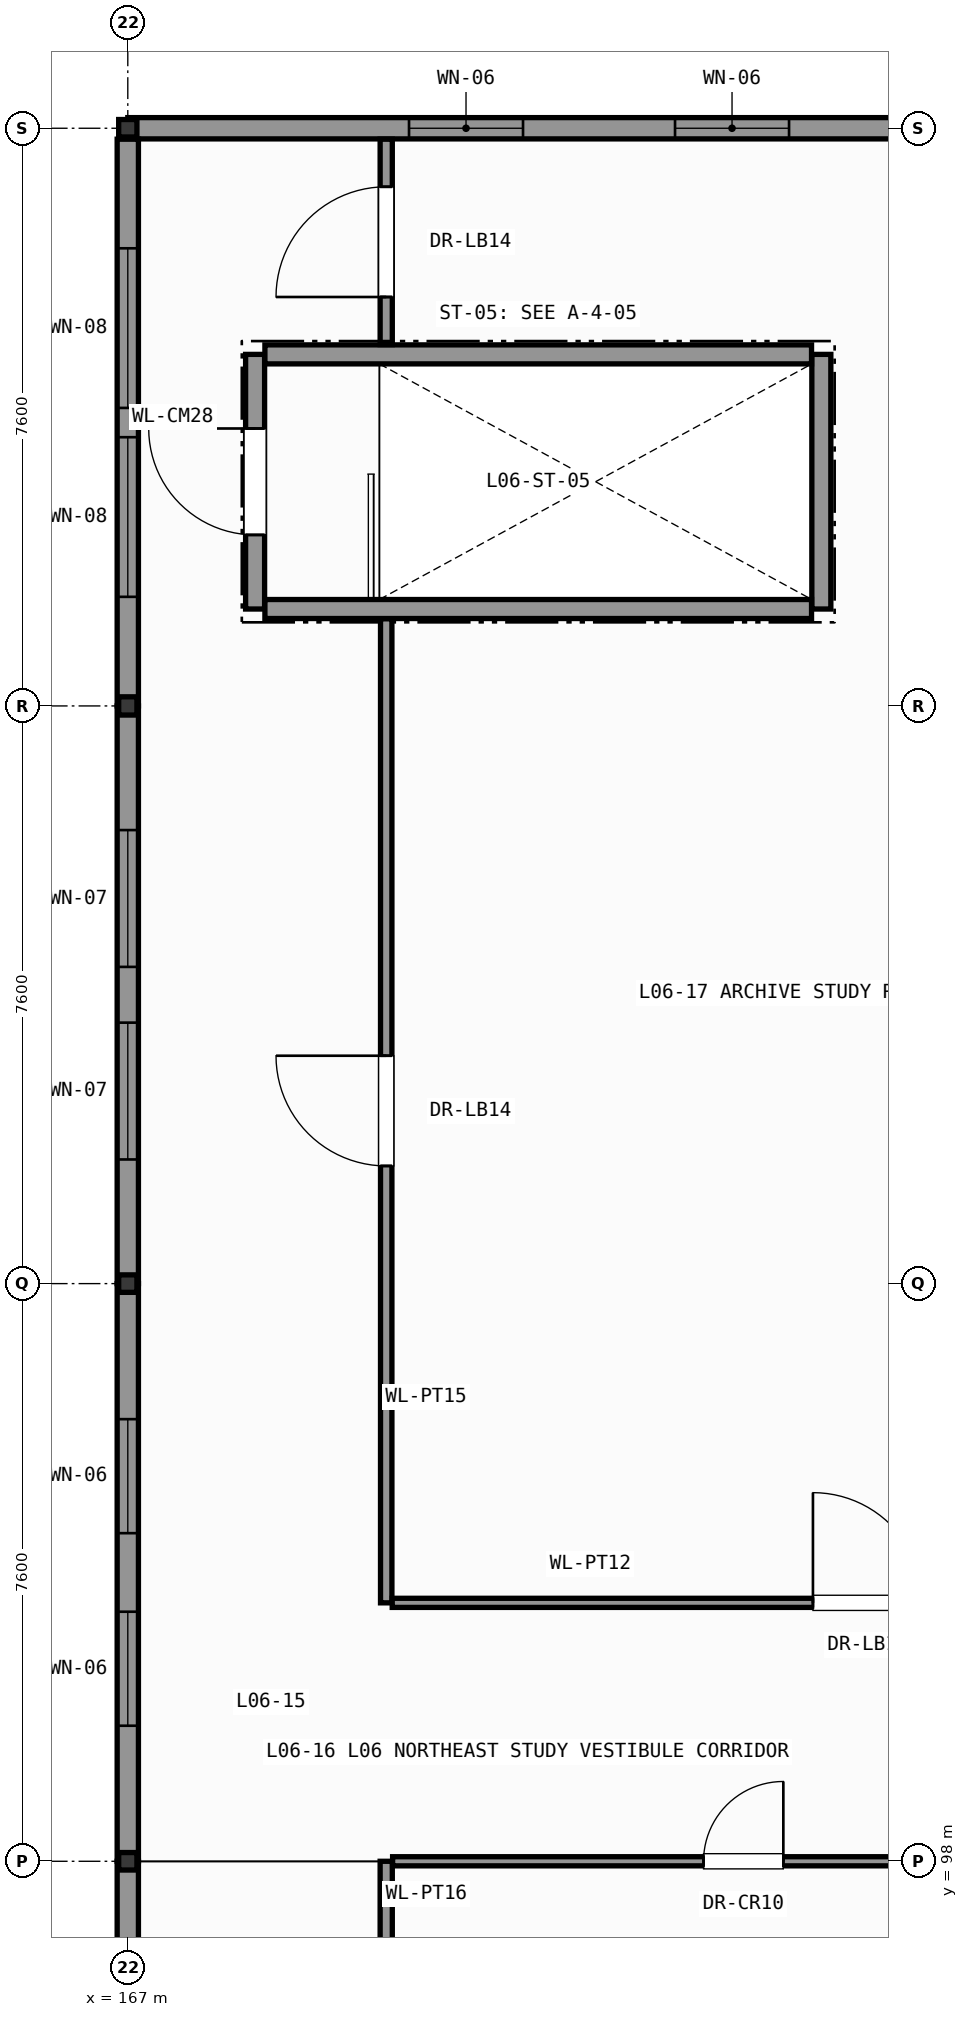
"""IFC4 building model, lengths in metres.
Left out: names, types, materials, properties, quantities, classifications, styles, units other than length and angle.
Written with IfcOpenShell. Run it as: python <this file> out.ifc"""

import sys

from ifc_helpers import new_model, si_unit, direction, frame, frame_2d, origin, origin_2d, place, context, subcontext, project, spatial, rectangle, i_section, extrude, element, fill, save


model = new_model("IFC4")
c1 = context("Model", 3, precision=1e-05, world=origin(), true_north=direction((0.0, 1.0)))
c2 = subcontext(c1, "Body", "Model", "MODEL_VIEW")
j1 = project(units=[si_unit("LENGTHUNIT", "METRE"), si_unit("PLANEANGLEUNIT", "RADIAN")], contexts=[c1])
p1 = place(None, origin())
s1 = spatial("IfcSite", under=j1, at=p1, CompositionType="ELEMENT")
p2 = place(p1, origin())
s2 = spatial("IfcBuilding", under=s1, at=p2, CompositionType="ELEMENT")
p3 = place(p2, frame((0.0, 0.0, 26.4)))
s3 = spatial("IfcBuildingStorey", under=s2, at=p3, CompositionType="ELEMENT", Elevation=26.4)
for number, where, z_axis, x_axis in (
    (1, (167.0, 98.0, 0.0), (0.0, 0.0, 1.0), (1.0, 0.0, 0.0)),
    (2, (167.0, 105.6, 0.0), (0.0, 0.0, 1.0), (1.0, 0.0, 0.0)),
):
    element("IfcColumn", number, at=place(p3, frame(where, z_axis=z_axis, x_axis=x_axis)), inside=s3, PredefinedType="COLUMN", context=c2, shape_type="SweptSolid", body=[
        extrude(i_section(OverallWidth=0.24, OverallDepth=0.23, WebThickness=0.008, FlangeThickness=0.012, FilletRadius=0.021, at=origin_2d()), origin(), (0.0, 0.0, 1.0), 4.2),
    ])
p4 = place(p3, frame((167.0, 113.2, 0.0), z_axis=(0.0, 0.0, 1.0), x_axis=(1.0, 0.0, 0.0)))
e3 = element("IfcColumn", 3, at=p4, inside=s3, PredefinedType="COLUMN", context=c2, shape_type="SweptSolid", body=[
    extrude(i_section(OverallWidth=0.24, OverallDepth=0.24, WebThickness=0.01, FlangeThickness=0.017, FilletRadius=0.021, at=origin_2d()), origin(), (0.0, 0.0, 1.0), 4.2),
])
p5 = place(p3, frame((167.0, 120.8, 0.0), z_axis=(0.0, 0.0, 1.0), x_axis=(1.0, 0.0, 0.0)))
e4 = element("IfcColumn", 4, at=p5, inside=s3, PredefinedType="COLUMN", context=c2, shape_type="SweptSolid", body=[
    extrude(i_section(OverallWidth=0.24, OverallDepth=0.23, WebThickness=0.008, FlangeThickness=0.012, FilletRadius=0.021, at=origin_2d()), origin(), (0.0, 0.0, 1.0), 4.2),
])
p6 = place(p3, frame((167.0, 120.8, 0.0), z_axis=(0.0, 0.0, 1.0), x_axis=(1.0, 0.0, 0.0)))
e5 = element("IfcWall", 5, at=p6, inside=s3, PredefinedType="SOLIDWALL", context=c2, shape_type="SweptSolid", body=[
    extrude(rectangle(XDim=12.0, YDim=0.28, at=frame_2d((6.0, 0.0))), origin(), (0.0, 0.0, 1.0), 3.435),
])
p7 = place(p6, frame((3.7, 0.0, 0.95)))
e6 = element("IfcOpeningElement", 6, at=p7, cuts=e5, PredefinedType="OPENING", context=c2, shape_type="SweptSolid", body=[
    extrude(rectangle(XDim=1.5, YDim=2.09, at=frame_2d((0.75, 1.045))), frame((0.0, 0.15, 0.0), z_axis=(0.0, -1.0, 0.0), x_axis=(1.0, 0.0, 0.0)), (0.0, 0.0, 1.0), 0.3),
])
p8 = place(p6, frame((7.2, 0.0, 0.95)))
e7 = element("IfcOpeningElement", 7, at=p8, cuts=e5, PredefinedType="OPENING", context=c2, shape_type="SweptSolid", body=[
    extrude(rectangle(XDim=1.5, YDim=2.09, at=frame_2d((0.75, 1.045))), frame((0.0, 0.15, 0.0), z_axis=(0.0, -1.0, 0.0), x_axis=(1.0, 0.0, 0.0)), (0.0, 0.0, 1.0), 0.3),
])
p9 = place(p3, frame((167.0, 113.2, 0.0), z_axis=(0.0, 0.0, 1.0), x_axis=(0.0, 1.0, 0.0)))
e8 = element("IfcWall", 8, at=p9, inside=s3, PredefinedType="SOLIDWALL", context=c2, shape_type="SweptSolid", body=[
    extrude(rectangle(XDim=7.456, YDim=0.28, at=frame_2d((3.728, 0.0))), origin(), (0.0, 0.0, 1.0), 3.695),
])
p10 = place(p9, frame((1.435, 0.0, 0.95)))
e9 = element("IfcOpeningElement", 9, at=p10, cuts=e8, PredefinedType="OPENING", context=c2, shape_type="SweptSolid", body=[
    extrude(rectangle(XDim=2.1, YDim=2.35, at=frame_2d((1.05, 1.175))), frame((0.0, 0.15, 0.0), z_axis=(0.0, -1.0, 0.0), x_axis=(1.0, 0.0, 0.0)), (0.0, 0.0, 1.0), 0.3),
])
p11 = place(p9, frame((3.921, 0.0, 0.95)))
e10 = element("IfcOpeningElement", 10, at=p11, cuts=e8, PredefinedType="OPENING", context=c2, shape_type="SweptSolid", body=[
    extrude(rectangle(XDim=2.1, YDim=2.35, at=frame_2d((1.05, 1.175))), frame((0.0, 0.15, 0.0), z_axis=(0.0, -1.0, 0.0), x_axis=(1.0, 0.0, 0.0)), (0.0, 0.0, 1.0), 0.3),
])
p12 = place(p3, frame((167.0, 105.6, 0.0), z_axis=(0.0, 0.0, 1.0), x_axis=(0.0, 1.0, 0.0)))
e11 = element("IfcWall", 11, at=p12, inside=s3, PredefinedType="SOLIDWALL", context=c2, shape_type="SweptSolid", body=[
    extrude(rectangle(XDim=7.6, YDim=0.28, at=frame_2d((3.8, 0.0))), origin(), (0.0, 0.0, 1.0), 3.695),
])
p13 = place(p12, frame((1.633, 0.0, 0.95)))
e12 = element("IfcOpeningElement", 12, at=p13, cuts=e11, PredefinedType="OPENING", context=c2, shape_type="SweptSolid", body=[
    extrude(rectangle(XDim=1.8, YDim=2.35, at=frame_2d((0.9, 1.175))), frame((0.0, 0.15, 0.0), z_axis=(0.0, -1.0, 0.0), x_axis=(1.0, 0.0, 0.0)), (0.0, 0.0, 1.0), 0.3),
])
p14 = place(p12, frame((4.167, 0.0, 0.95)))
e13 = element("IfcOpeningElement", 13, at=p14, cuts=e11, PredefinedType="OPENING", context=c2, shape_type="SweptSolid", body=[
    extrude(rectangle(XDim=1.8, YDim=2.35, at=frame_2d((0.9, 1.175))), frame((0.0, 0.15, 0.0), z_axis=(0.0, -1.0, 0.0), x_axis=(1.0, 0.0, 0.0)), (0.0, 0.0, 1.0), 0.3),
])
p15 = place(p3, frame((167.0, 98.0, 0.0), z_axis=(0.0, 0.0, 1.0), x_axis=(0.0, 1.0, 0.0)))
e14 = element("IfcWall", 14, at=p15, inside=s3, PredefinedType="SOLIDWALL", context=c2, shape_type="SweptSolid", body=[
    extrude(rectangle(XDim=7.6, YDim=0.28, at=frame_2d((3.8, 0.0))), origin(), (0.0, 0.0, 1.0), 3.695),
])
p16 = place(p15, frame((1.783, 0.0, 0.95)))
e15 = element("IfcOpeningElement", 15, at=p16, cuts=e14, PredefinedType="OPENING", context=c2, shape_type="SweptSolid", body=[
    extrude(rectangle(XDim=1.5, YDim=2.35, at=frame_2d((0.75, 1.175))), frame((0.0, 0.15, 0.0), z_axis=(0.0, -1.0, 0.0), x_axis=(1.0, 0.0, 0.0)), (0.0, 0.0, 1.0), 0.3),
])
p17 = place(p15, frame((4.317, 0.0, 0.95)))
e16 = element("IfcOpeningElement", 16, at=p17, cuts=e14, PredefinedType="OPENING", context=c2, shape_type="SweptSolid", body=[
    extrude(rectangle(XDim=1.5, YDim=2.35, at=frame_2d((0.75, 1.175))), frame((0.0, 0.15, 0.0), z_axis=(0.0, -1.0, 0.0), x_axis=(1.0, 0.0, 0.0)), (0.0, 0.0, 1.0), 0.3),
])
p18 = place(p3, frame((167.0, 90.4, 0.0), z_axis=(0.0, 0.0, 1.0), x_axis=(0.0, 1.0, 0.0)))
e17 = element("IfcWall", 17, at=p18, inside=s3, PredefinedType="SOLIDWALL", context=c2, shape_type="SweptSolid", body=[
    extrude(rectangle(XDim=7.6, YDim=0.28, at=frame_2d((3.8, 0.0))), origin(), (0.0, 0.0, 1.0), 3.695),
])
p19 = place(p18, frame((1.483, 0.0, 0.95)))
e18 = element("IfcOpeningElement", 18, at=p19, cuts=e17, PredefinedType="OPENING", context=c2, shape_type="SweptSolid", body=[
    extrude(rectangle(XDim=2.1, YDim=2.35, at=frame_2d((1.05, 1.175))), frame((0.0, 0.15, 0.0), z_axis=(0.0, -1.0, 0.0), x_axis=(1.0, 0.0, 0.0)), (0.0, 0.0, 1.0), 0.3),
])
p20 = place(p18, frame((4.017, 0.0, 0.95)))
e19 = element("IfcOpeningElement", 19, at=p20, cuts=e17, PredefinedType="OPENING", context=c2, shape_type="SweptSolid", body=[
    extrude(rectangle(XDim=2.1, YDim=2.35, at=frame_2d((1.05, 1.175))), frame((0.0, 0.15, 0.0), z_axis=(0.0, -1.0, 0.0), x_axis=(1.0, 0.0, 0.0)), (0.0, 0.0, 1.0), 0.3),
])
p21 = place(p3, frame((168.675, 114.475, 0.0), z_axis=(0.0, 0.0, 1.0), x_axis=(0.0, 1.0, 0.0)))
e20 = element("IfcWall", 20, at=p21, inside=s3, PredefinedType="SHEAR", context=c2, shape_type="SweptSolid", body=[
    extrude(rectangle(XDim=3.35, YDim=0.25, at=frame_2d((1.675, 0.0))), origin(), (0.0, 0.0, 1.0), 4.0),
])
p22 = place(p21, frame((0.975, 0.0, 0.0)))
e21 = element("IfcOpeningElement", 21, at=p22, cuts=e20, PredefinedType="OPENING", context=c2, shape_type="SweptSolid", body=[
    extrude(rectangle(XDim=1.4, YDim=2.2, at=frame_2d((0.7, 1.1))), frame((0.0, 0.135, 0.0), z_axis=(0.0, -1.0, 0.0), x_axis=(1.0, 0.0, 0.0)), (0.0, 0.0, 1.0), 0.27),
])
p23 = place(p3, frame((176.125, 114.475, 0.0), z_axis=(0.0, 0.0, 1.0), x_axis=(0.0, 1.0, 0.0)))
e22 = element("IfcWall", 22, at=p23, inside=s3, PredefinedType="SHEAR", context=c2, shape_type="SweptSolid", body=[
    extrude(rectangle(XDim=3.35, YDim=0.25, at=frame_2d((1.675, 0.0))), origin(), (0.0, 0.0, 1.0), 4.0),
])
for number, where, z_axis, x_axis in (
    (23, (168.804, 114.475, 0.0), (0.0, 0.0, 1.0), (1.0, 0.0, 0.0)),
    (24, (168.804, 117.825, 0.0), (0.0, 0.0, 1.0), (1.0, 0.0, 0.0)),
):
    element("IfcWall", number, at=place(p3, frame(where, z_axis=z_axis, x_axis=x_axis)), inside=s3, PredefinedType="SHEAR", context=c2, shape_type="SweptSolid", body=[
        extrude(rectangle(XDim=7.192, YDim=0.25, at=frame_2d((3.596, 0.0))), origin(), (0.0, 0.0, 1.0), 4.0),
    ])
p24 = place(p3, frame((170.4, 94.6, 0.0), z_axis=(0.0, 0.0, 1.0), x_axis=(0.0, 1.0, 0.0)))
e25 = element("IfcWall", 25, at=p24, inside=s3, PredefinedType="PARTITIONING", context=c2, shape_type="SweptSolid", body=[
    extrude(rectangle(XDim=3.4, YDim=0.16, at=frame_2d((1.7, 0.0))), origin(), (0.0, 0.0, 1.0), 4.0),
])
p25 = place(p24, frame((1.175, 0.0, 0.0)))
e26 = element("IfcOpeningElement", 26, at=p25, cuts=e25, PredefinedType="OPENING", context=c2, shape_type="SweptSolid", body=[
    extrude(rectangle(XDim=1.05, YDim=2.2, at=frame_2d((0.525, 1.1))), frame((0.0, 0.09, 0.0), z_axis=(0.0, -1.0, 0.0), x_axis=(1.0, 0.0, 0.0)), (0.0, 0.0, 1.0), 0.18),
])
p26 = place(p3, frame((170.484, 98.0, 0.0), z_axis=(0.0, 0.0, 1.0), x_axis=(1.0, 0.0, 0.0)))
e27 = element("IfcWall", 27, at=p26, inside=s3, PredefinedType="PARTITIONING", context=c2, shape_type="SweptSolid", body=[
    extrude(rectangle(XDim=9.232, YDim=0.12, at=frame_2d((4.616, 0.0))), origin(), (0.0, 0.0, 1.0), 3.435),
])
p27 = place(p26, frame((4.091, 0.0, 0.0)))
e28 = element("IfcOpeningElement", 28, at=p27, cuts=e27, PredefinedType="OPENING", context=c2, shape_type="SweptSolid", body=[
    extrude(rectangle(XDim=1.05, YDim=2.2, at=frame_2d((0.525, 1.1))), frame((0.0, 0.07, 0.0), z_axis=(0.0, -1.0, 0.0), x_axis=(1.0, 0.0, 0.0)), (0.0, 0.0, 1.0), 0.14),
])
p28 = place(p3, frame((170.4, 117.954, 0.0), z_axis=(0.0, 0.0, 1.0), x_axis=(0.0, 1.0, 0.0)))
e29 = element("IfcWall", 29, at=p28, inside=s3, PredefinedType="PARTITIONING", context=c2, shape_type="SweptSolid", body=[
    extrude(rectangle(XDim=2.702, YDim=0.16, at=frame_2d((1.351, 0.0))), origin(), (0.0, 0.0, 1.0), 4.0),
])
p29 = place(p28, frame((0.626, 0.0, 0.0)))
e30 = element("IfcOpeningElement", 30, at=p29, cuts=e29, PredefinedType="OPENING", context=c2, shape_type="SweptSolid", body=[
    extrude(rectangle(XDim=1.45, YDim=2.35, at=frame_2d((0.725, 1.175))), frame((0.0, 0.09, 0.0), z_axis=(0.0, -1.0, 0.0), x_axis=(1.0, 0.0, 0.0)), (0.0, 0.0, 1.0), 0.18),
])
p30 = place(p3, frame((170.4, 101.4, 0.0), z_axis=(0.0, 0.0, 1.0), x_axis=(0.0, 1.0, 0.0)))
e31 = element("IfcWall", 31, at=p30, inside=s3, PredefinedType="PARTITIONING", context=c2, shape_type="SweptSolid", body=[
    extrude(rectangle(XDim=12.946, YDim=0.15, at=frame_2d((6.473, 0.0))), origin(), (0.0, 0.0, 1.0), 4.0),
])
p31 = place(p30, frame((5.748, 0.0, 0.0)))
e32 = element("IfcOpeningElement", 32, at=p31, cuts=e31, PredefinedType="OPENING", context=c2, shape_type="SweptSolid", body=[
    extrude(rectangle(XDim=1.45, YDim=2.35, at=frame_2d((0.725, 1.175))), frame((0.0, 0.085, 0.0), z_axis=(0.0, -1.0, 0.0), x_axis=(1.0, 0.0, 0.0)), (0.0, 0.0, 1.0), 0.17),
])
p32 = place(p3, frame((170.479, 101.4, 0.0), z_axis=(0.0, 0.0, 1.0), x_axis=(1.0, 0.0, 0.0)))
e33 = element("IfcWall", 33, at=p32, inside=s3, PredefinedType="PARTITIONING", context=c2, shape_type="SweptSolid", body=[
    extrude(rectangle(XDim=12.521, YDim=0.12, at=frame_2d((6.26, 0.0))), origin(), (0.0, 0.0, 1.0), 4.0),
])
p33 = place(p32, frame((5.535, 0.0, 0.0)))
e34 = element("IfcOpeningElement", 34, at=p33, cuts=e33, PredefinedType="OPENING", context=c2, shape_type="SweptSolid", body=[
    extrude(rectangle(XDim=1.45, YDim=2.35, at=frame_2d((0.725, 1.175))), frame((0.0, 0.07, 0.0), z_axis=(0.0, -1.0, 0.0), x_axis=(1.0, 0.0, 0.0)), (0.0, 0.0, 1.0), 0.14),
])
p34 = place(p7, origin())
e35 = element("IfcWindow", 35, at=p34, inside=s3, PartitioningType="SINGLE_PANEL", PredefinedType="WINDOW", context=c2, shape_type="SweptSolid", body=[
    extrude(rectangle(XDim=1.5, YDim=2.09, at=frame_2d((0.75, 1.045))), frame((0.0, 0.03, 0.0), z_axis=(0.0, -1.0, 0.0), x_axis=(1.0, 0.0, 0.0)), (0.0, 0.0, 1.0), 0.06),
])
fill(e6, e35)
p35 = place(p8, origin())
e36 = element("IfcWindow", 36, at=p35, inside=s3, PartitioningType="SINGLE_PANEL", PredefinedType="WINDOW", context=c2, shape_type="SweptSolid", body=[
    extrude(rectangle(XDim=1.5, YDim=2.09, at=frame_2d((0.75, 1.045))), frame((0.0, 0.03, 0.0), z_axis=(0.0, -1.0, 0.0), x_axis=(1.0, 0.0, 0.0)), (0.0, 0.0, 1.0), 0.06),
])
fill(e7, e36)
p36 = place(p10, origin())
e37 = element("IfcWindow", 37, at=p36, inside=s3, PartitioningType="SINGLE_PANEL", PredefinedType="WINDOW", context=c2, shape_type="SweptSolid", body=[
    extrude(rectangle(XDim=2.1, YDim=2.35, at=frame_2d((1.05, 1.175))), frame((0.0, 0.03, 0.0), z_axis=(0.0, -1.0, 0.0), x_axis=(1.0, 0.0, 0.0)), (0.0, 0.0, 1.0), 0.06),
])
fill(e9, e37)
p37 = place(p11, origin())
e38 = element("IfcWindow", 38, at=p37, inside=s3, PartitioningType="SINGLE_PANEL", PredefinedType="WINDOW", context=c2, shape_type="SweptSolid", body=[
    extrude(rectangle(XDim=2.1, YDim=2.35, at=frame_2d((1.05, 1.175))), frame((0.0, 0.03, 0.0), z_axis=(0.0, -1.0, 0.0), x_axis=(1.0, 0.0, 0.0)), (0.0, 0.0, 1.0), 0.06),
])
fill(e10, e38)
p38 = place(p13, origin())
e39 = element("IfcWindow", 39, at=p38, inside=s3, PartitioningType="SINGLE_PANEL", PredefinedType="WINDOW", context=c2, shape_type="SweptSolid", body=[
    extrude(rectangle(XDim=1.8, YDim=2.35, at=frame_2d((0.9, 1.175))), frame((0.0, 0.03, 0.0), z_axis=(0.0, -1.0, 0.0), x_axis=(1.0, 0.0, 0.0)), (0.0, 0.0, 1.0), 0.06),
])
fill(e12, e39)
p39 = place(p14, origin())
e40 = element("IfcWindow", 40, at=p39, inside=s3, PartitioningType="SINGLE_PANEL", PredefinedType="WINDOW", context=c2, shape_type="SweptSolid", body=[
    extrude(rectangle(XDim=1.8, YDim=2.35, at=frame_2d((0.9, 1.175))), frame((0.0, 0.03, 0.0), z_axis=(0.0, -1.0, 0.0), x_axis=(1.0, 0.0, 0.0)), (0.0, 0.0, 1.0), 0.06),
])
fill(e13, e40)
p40 = place(p16, origin())
e41 = element("IfcWindow", 41, at=p40, inside=s3, PartitioningType="SINGLE_PANEL", PredefinedType="WINDOW", context=c2, shape_type="SweptSolid", body=[
    extrude(rectangle(XDim=1.5, YDim=2.35, at=frame_2d((0.75, 1.175))), frame((0.0, 0.03, 0.0), z_axis=(0.0, -1.0, 0.0), x_axis=(1.0, 0.0, 0.0)), (0.0, 0.0, 1.0), 0.06),
])
fill(e15, e41)
p41 = place(p17, origin())
e42 = element("IfcWindow", 42, at=p41, inside=s3, PartitioningType="SINGLE_PANEL", PredefinedType="WINDOW", context=c2, shape_type="SweptSolid", body=[
    extrude(rectangle(XDim=1.5, YDim=2.35, at=frame_2d((0.75, 1.175))), frame((0.0, 0.03, 0.0), z_axis=(0.0, -1.0, 0.0), x_axis=(1.0, 0.0, 0.0)), (0.0, 0.0, 1.0), 0.06),
])
fill(e16, e42)
p42 = place(p22, origin())
e43 = element("IfcDoor", 43, at=p42, inside=s3, OperationType="SINGLE_SWING_RIGHT", PredefinedType="DOOR", context=c2, shape_type="SweptSolid", body=[
    extrude(rectangle(XDim=1.4, YDim=2.2, at=frame_2d((0.7, 1.1))), frame((0.0, 0.025, 0.0), z_axis=(0.0, -1.0, 0.0), x_axis=(1.0, 0.0, 0.0)), (0.0, 0.0, 1.0), 0.05),
])
fill(e21, e43)
p43 = place(p27, origin())
e44 = element("IfcDoor", 44, at=p43, inside=s3, OperationType="SINGLE_SWING_RIGHT", PredefinedType="DOOR", context=c2, shape_type="SweptSolid", body=[
    extrude(rectangle(XDim=1.05, YDim=2.2, at=frame_2d((0.525, 1.1))), frame((0.0, 0.025, 0.0), z_axis=(0.0, -1.0, 0.0), x_axis=(1.0, 0.0, 0.0)), (0.0, 0.0, 1.0), 0.05),
])
fill(e28, e44)
p44 = place(p29, origin())
e45 = element("IfcDoor", 45, at=p44, inside=s3, OperationType="SINGLE_SWING_LEFT", PredefinedType="DOOR", context=c2, shape_type="SweptSolid", body=[
    extrude(rectangle(XDim=1.45, YDim=2.35, at=frame_2d((0.725, 1.175))), frame((0.0, 0.025, 0.0), z_axis=(0.0, -1.0, 0.0), x_axis=(1.0, 0.0, 0.0)), (0.0, 0.0, 1.0), 0.05),
])
fill(e30, e45)
p45 = place(p31, origin())
e46 = element("IfcDoor", 46, at=p45, inside=s3, OperationType="SINGLE_SWING_RIGHT", PredefinedType="DOOR", context=c2, shape_type="SweptSolid", body=[
    extrude(rectangle(XDim=1.45, YDim=2.35, at=frame_2d((0.725, 1.175))), frame((0.0, 0.025, 0.0), z_axis=(0.0, -1.0, 0.0), x_axis=(1.0, 0.0, 0.0)), (0.0, 0.0, 1.0), 0.05),
])
fill(e32, e46)
p46 = place(p33, origin())
e47 = element("IfcDoor", 47, at=p46, inside=s3, OperationType="SINGLE_SWING_LEFT", PredefinedType="DOOR", context=c2, shape_type="SweptSolid", body=[
    extrude(rectangle(XDim=1.45, YDim=2.35, at=frame_2d((0.725, 1.175))), frame((0.0, 0.025, 0.0), z_axis=(0.0, -1.0, 0.0), x_axis=(1.0, 0.0, 0.0)), (0.0, 0.0, 1.0), 0.05),
])
fill(e34, e47)
save(model, sys.argv[1])
